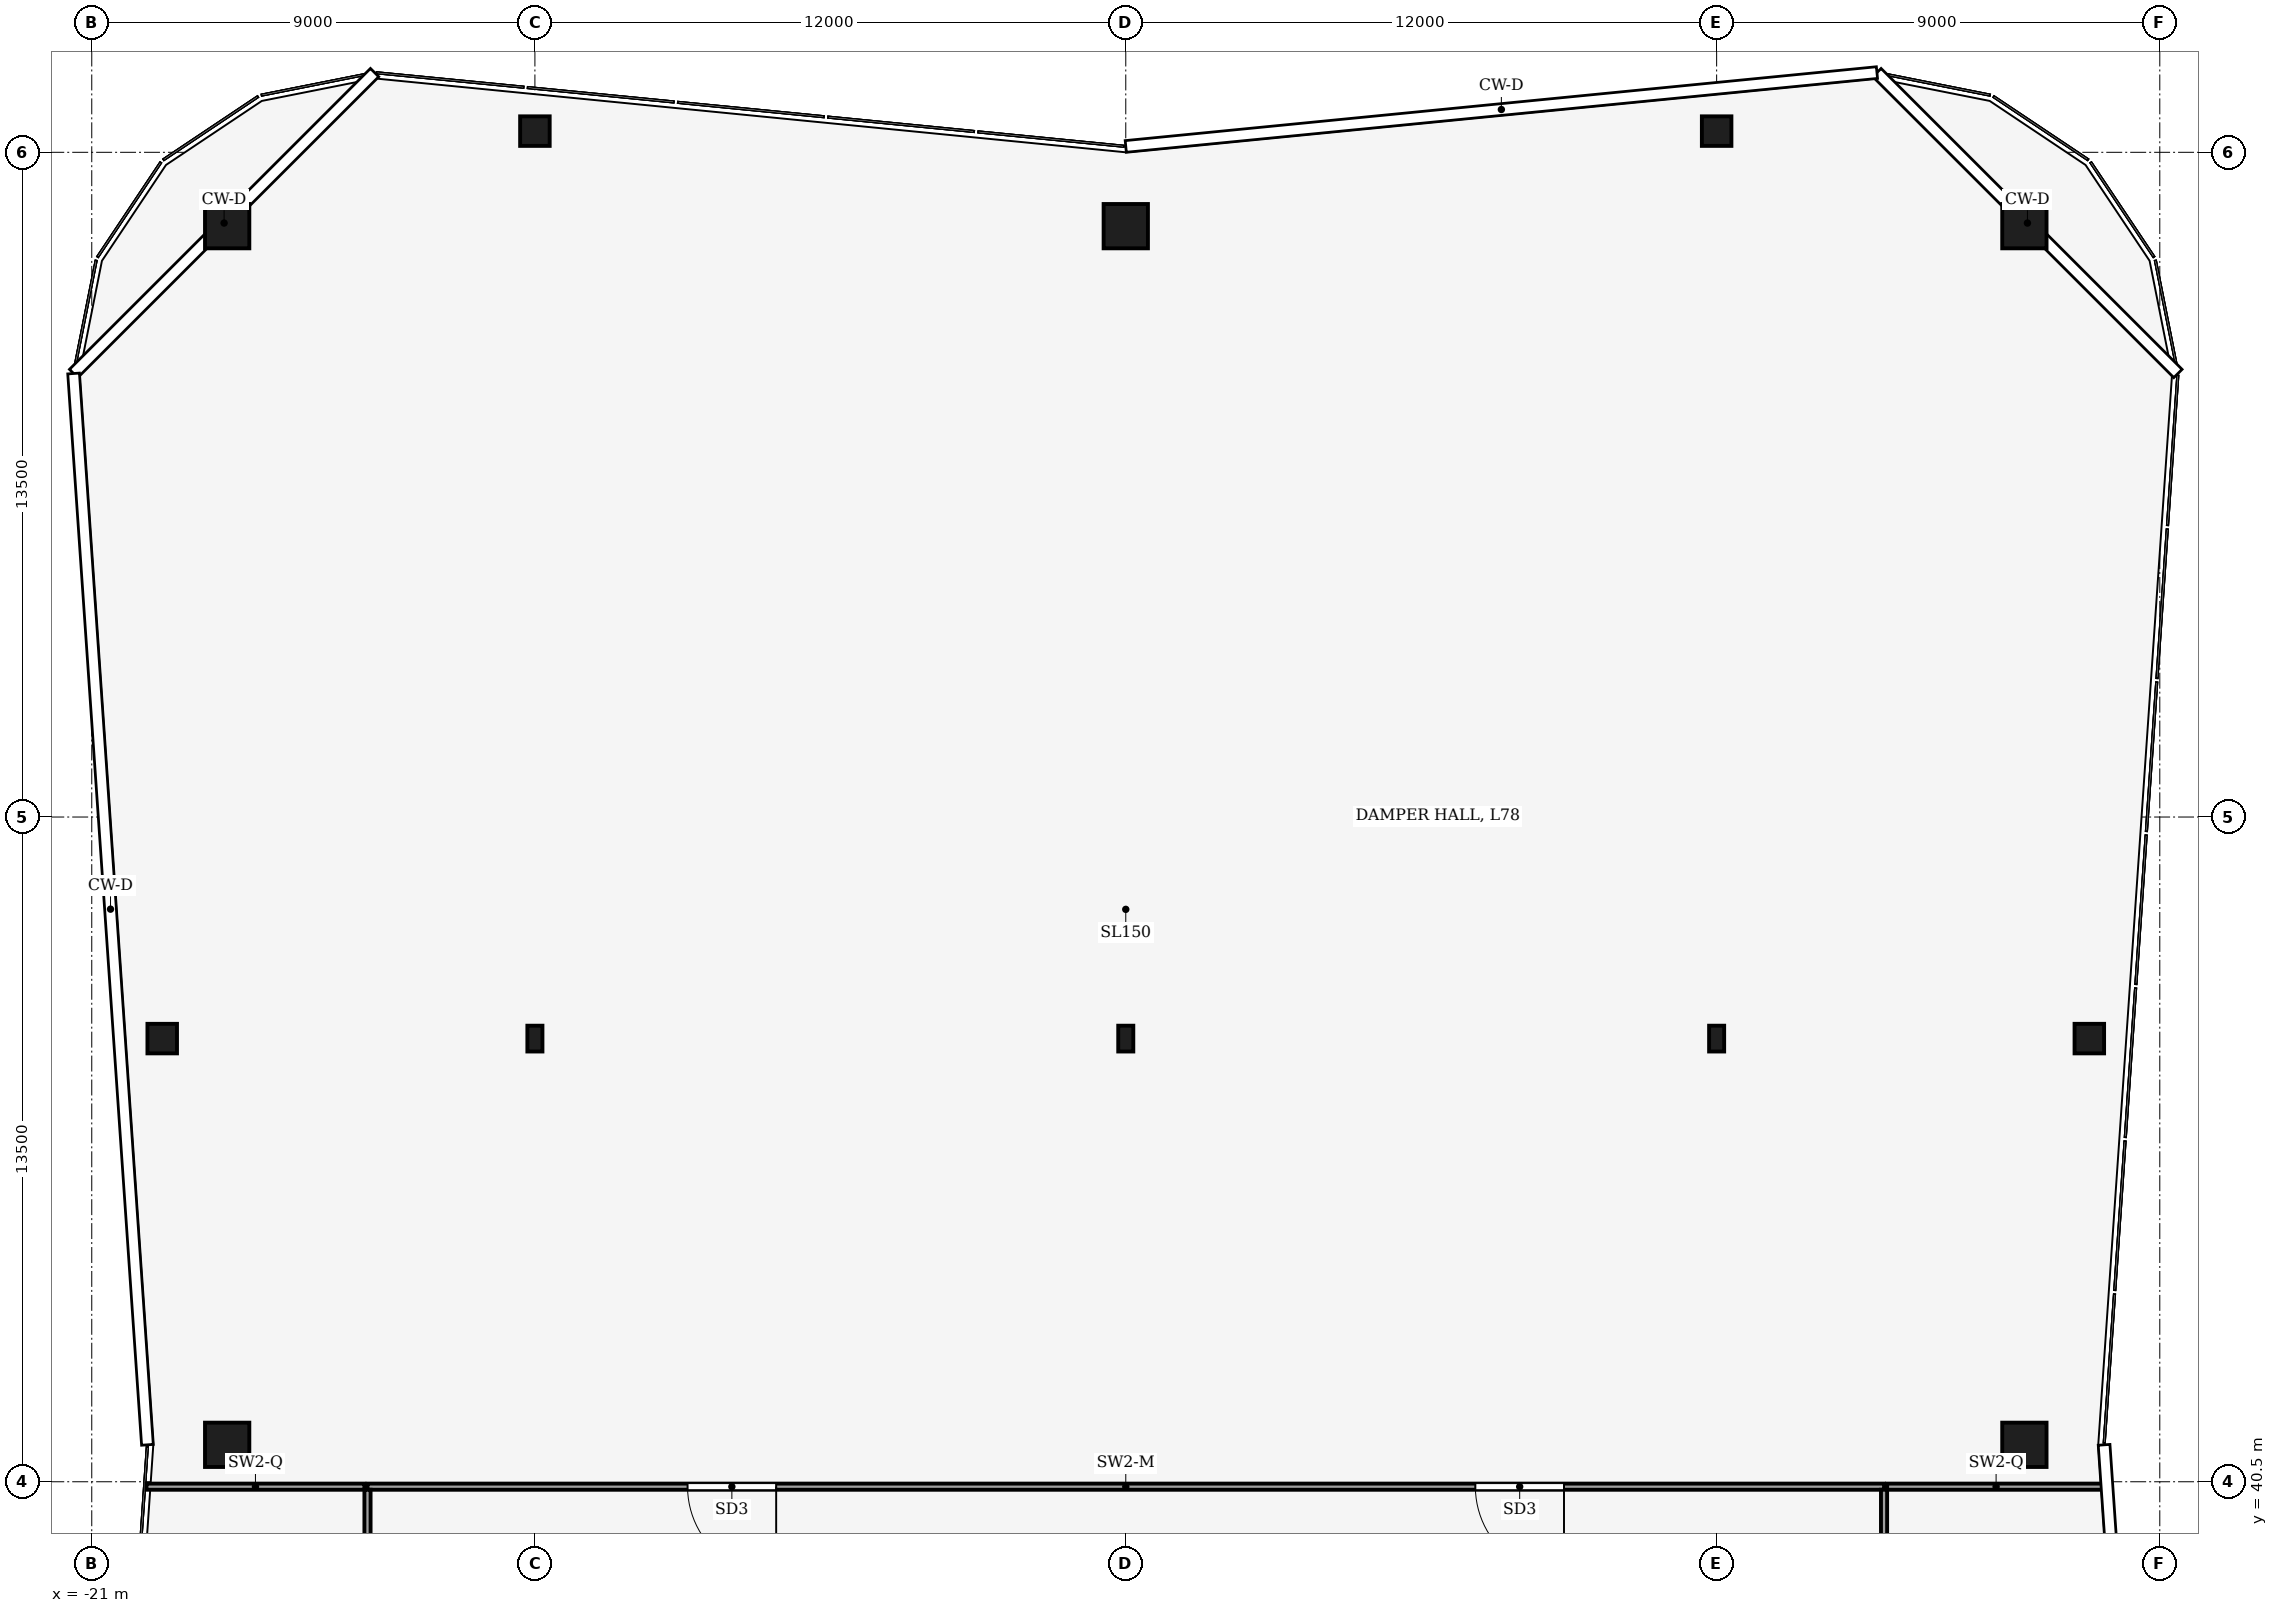
"""IFC4 building model, lengths in metres.
Left out: names, types, materials, properties, quantities, classifications, styles, units other than length and angle.
Written with IfcOpenShell. Run it as: python <this file> out.ifc"""

import sys

from ifc_helpers import new_model, si_unit, direction, frame, frame_2d, origin, origin_2d, place, context, subcontext, project, spatial, rectangle, hollow_rectangle, i_section, extrude, element, fill, save


model = new_model("IFC4")
c1 = context("Model", 3, precision=1e-05, world=origin(), true_north=direction((0.0, 1.0)))
c2 = subcontext(c1, "Body", "Model", "MODEL_VIEW")
j1 = project(units=[si_unit("LENGTHUNIT", "METRE"), si_unit("PLANEANGLEUNIT", "RADIAN")], contexts=[c1])
p1 = place(None, origin())
s1 = spatial("IfcSite", under=j1, at=p1, CompositionType="ELEMENT")
p2 = place(p1, origin())
s2 = spatial("IfcBuilding", under=s1, at=p2, CompositionType="ELEMENT")
p3 = place(p2, frame((0.0, 0.0, 340.5)))
s3 = spatial("IfcBuildingStorey", under=s2, at=p3, CompositionType="ELEMENT", Elevation=340.5)
for number, where, z_axis, x_axis in (
    (1, (-18.25, 66.0, 0.0), (0.0, 0.0, 1.0), (1.0, 0.0, 0.0)),
    (2, (0.0, 66.0, 0.0), (0.0, 0.0, 1.0), (1.0, 0.0, 0.0)),
    (3, (18.25, 66.0, 0.0), (0.0, 0.0, 1.0), (1.0, 0.0, 0.0)),
    (4, (18.25, 41.25, 0.0), (0.0, 0.0, 1.0), (1.0, 0.0, 0.0)),
    (5, (-18.25, 41.25, 0.0), (0.0, 0.0, 1.0), (1.0, 0.0, 0.0)),
):
    element("IfcColumn", number, at=place(p3, frame(where, z_axis=z_axis, x_axis=x_axis)), inside=s3, PredefinedType="COLUMN", context=c2, shape_type="SweptSolid", body=[
        extrude(hollow_rectangle(XDim=0.9, YDim=0.9, WallThickness=0.04, at=origin_2d()), origin(), (0.0, 0.0, 1.0), 9.0),
    ])
for number, where, z_axis, x_axis in (
    (6, (-12.0, 67.93, 0.0), (0.0, 0.0, 1.0), (1.0, 0.0, 0.0)),
    (7, (12.0, 67.93, 0.0), (0.0, 0.0, 1.0), (1.0, 0.0, 0.0)),
    (8, (19.569, 49.5, 0.0), (0.0, 0.0, 1.0), (1.0, 0.0, 0.0)),
    (9, (-19.569, 49.5, 0.0), (0.0, 0.0, 1.0), (1.0, 0.0, 0.0)),
):
    element("IfcColumn", number, at=place(p3, frame(where, z_axis=z_axis, x_axis=x_axis)), inside=s3, PredefinedType="COLUMN", context=c2, shape_type="SweptSolid", body=[
        extrude(hollow_rectangle(XDim=0.6, YDim=0.6, WallThickness=0.025, at=origin_2d()), origin(), (0.0, 0.0, 1.0), 9.0),
    ])
for number, where, z_axis, x_axis in (
    (10, (-12.0, 49.5, 0.0), (0.0, 0.0, 1.0), (1.0, 0.0, 0.0)),
    (11, (0.0, 49.5, 0.0), (0.0, 0.0, 1.0), (1.0, 0.0, 0.0)),
    (12, (12.0, 49.5, 0.0), (0.0, 0.0, 1.0), (1.0, 0.0, 0.0)),
):
    element("IfcColumn", number, at=place(p3, frame(where, z_axis=z_axis, x_axis=x_axis)), inside=s3, PredefinedType="COLUMN", context=c2, shape_type="SweptSolid", body=[
        extrude(i_section(OverallWidth=0.306, OverallDepth=0.524, WebThickness=0.012, FlangeThickness=0.04, FilletRadius=0.027, at=origin_2d()), origin(), (0.0, 0.0, 1.0), 9.0),
    ])
p4 = place(p3, frame((15.4, 40.4, 0.0), z_axis=(0.0, 0.0, 1.0), x_axis=(-1.0, 0.0, 0.0)))
e13 = element("IfcWall", 13, at=p4, inside=s3, PredefinedType="PARTITIONING", context=c2, shape_type="SweptSolid", body=[
    extrude(rectangle(XDim=30.8, YDim=0.125, at=frame_2d((15.4, 0.0))), origin(), (0.0, 0.0, 1.0), 8.37),
])
p5 = place(p4, frame((22.5, 0.0, 0.0)))
e14 = element("IfcOpeningElement", 14, at=p5, cuts=e13, PredefinedType="OPENING", context=c2, shape_type="SweptSolid", body=[
    extrude(rectangle(XDim=1.8, YDim=2.4, at=frame_2d((0.9, 1.2))), frame((0.0, 0.073, 0.0), z_axis=(0.0, -1.0, 0.0), x_axis=(1.0, 0.0, 0.0)), (0.0, 0.0, 1.0), 0.145),
])
p6 = place(p4, frame((6.5, 0.0, 0.0)))
e15 = element("IfcOpeningElement", 15, at=p6, cuts=e13, PredefinedType="OPENING", context=c2, shape_type="SweptSolid", body=[
    extrude(rectangle(XDim=1.8, YDim=2.4, at=frame_2d((0.9, 1.2))), frame((0.0, 0.073, 0.0), z_axis=(0.0, -1.0, 0.0), x_axis=(1.0, 0.0, 0.0)), (0.0, 0.0, 1.0), 0.145),
])
p7 = place(p3, frame((-15.4, 40.337, 0.0), z_axis=(0.0, 0.0, 1.0), x_axis=(0.0, -1.0, 0.0)))
e16 = element("IfcWall", 16, at=p7, inside=s3, PredefinedType="PARTITIONING", context=c2, shape_type="SweptSolid", body=[
    extrude(rectangle(XDim=10.137, YDim=0.125, at=frame_2d((5.069, 0.0))), origin(), (0.0, 0.0, 1.0), 8.12),
])
p8 = place(p7, frame((4.569, 0.0, 0.0)))
e17 = element("IfcOpeningElement", 17, at=p8, cuts=e16, PredefinedType="OPENING", context=c2, shape_type="SweptSolid", body=[
    extrude(rectangle(XDim=1.0, YDim=2.1, at=frame_2d((0.5, 1.05))), frame((0.0, 0.073, 0.0), z_axis=(0.0, -1.0, 0.0), x_axis=(1.0, 0.0, 0.0)), (0.0, 0.0, 1.0), 0.145),
])
p9 = place(p3, frame((15.4, 30.2, 0.0), z_axis=(0.0, 0.0, 1.0), x_axis=(0.0, 1.0, 0.0)))
e18 = element("IfcWall", 18, at=p9, inside=s3, PredefinedType="PARTITIONING", context=c2, shape_type="SweptSolid", body=[
    extrude(rectangle(XDim=10.137, YDim=0.125, at=frame_2d((5.069, 0.0))), origin(), (0.0, 0.0, 1.0), 8.12),
])
p10 = place(p9, frame((4.569, 0.0, 0.0)))
e19 = element("IfcOpeningElement", 19, at=p10, cuts=e18, PredefinedType="OPENING", context=c2, shape_type="SweptSolid", body=[
    extrude(rectangle(XDim=1.0, YDim=2.1, at=frame_2d((0.5, 1.05))), frame((0.0, 0.073, 0.0), z_axis=(0.0, -1.0, 0.0), x_axis=(1.0, 0.0, 0.0)), (0.0, 0.0, 1.0), 0.145),
])
for number, where, z_axis, x_axis in (
    (20, (-15.462, 40.4, 0.0), (0.0, 0.0, 1.0), (-1.0, 0.0, 0.0)),
    (21, (19.889, 40.4, 0.0), (0.0, 0.0, 1.0), (-1.0, 0.0, 0.0)),
):
    element("IfcWall", number, at=place(p3, frame(where, z_axis=z_axis, x_axis=x_axis)), inside=s3, PredefinedType="PARTITIONING", context=c2, shape_type="SweptSolid", body=[
        extrude(rectangle(XDim=4.426, YDim=0.125, at=frame_2d((2.213, 0.0))), origin(), (0.0, 0.0, 1.0), 8.02),
    ])
p11 = place(p5, origin())
e22 = element("IfcDoor", 22, at=p11, inside=s3, OperationType="DOUBLE_DOOR_SINGLE_SWING", PredefinedType="DOOR", context=c2, shape_type="SweptSolid", body=[
    extrude(rectangle(XDim=1.8, YDim=2.4, at=frame_2d((0.9, 1.2))), frame((0.0, 0.025, 0.0), z_axis=(0.0, -1.0, 0.0), x_axis=(1.0, 0.0, 0.0)), (0.0, 0.0, 1.0), 0.05),
])
fill(e14, e22)
p12 = place(p6, origin())
e23 = element("IfcDoor", 23, at=p12, inside=s3, OperationType="DOUBLE_DOOR_SINGLE_SWING", PredefinedType="DOOR", context=c2, shape_type="SweptSolid", body=[
    extrude(rectangle(XDim=1.8, YDim=2.4, at=frame_2d((0.9, 1.2))), frame((0.0, 0.025, 0.0), z_axis=(0.0, -1.0, 0.0), x_axis=(1.0, 0.0, 0.0)), (0.0, 0.0, 1.0), 0.05),
])
fill(e15, e23)
save(model, sys.argv[1])
